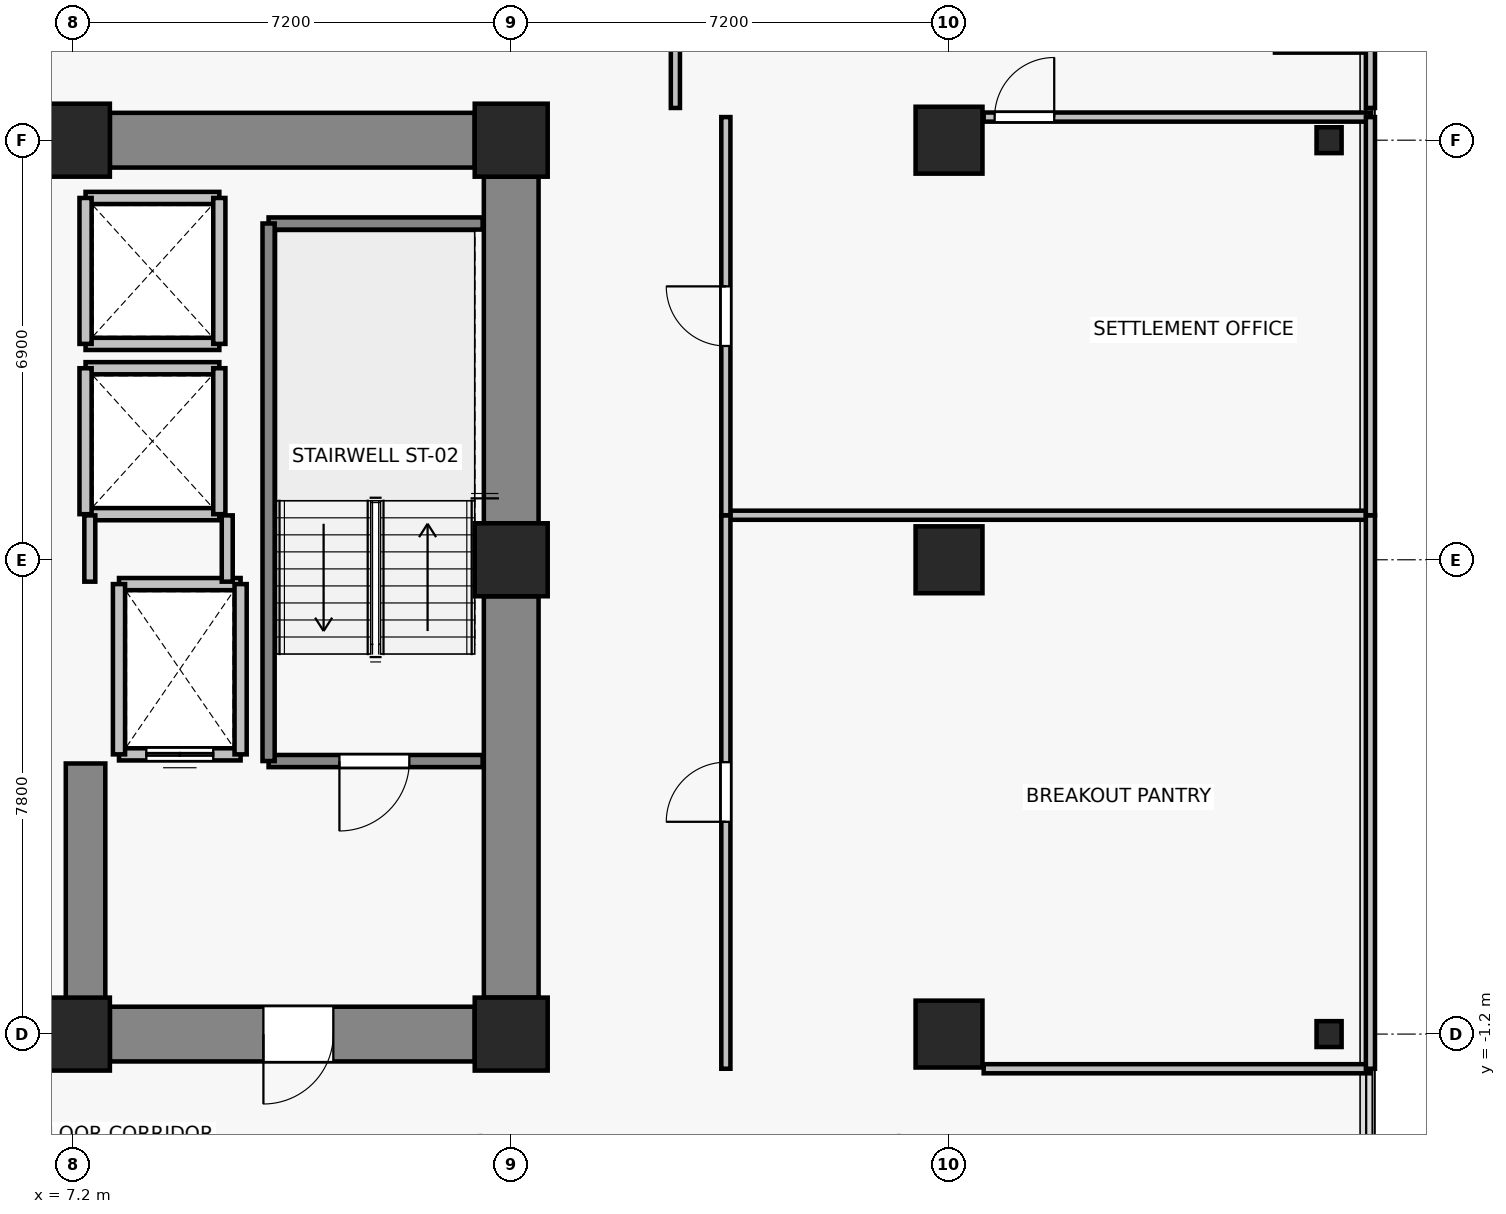
"""IFC4 building model, lengths in metres.
Left out: names, types, materials, properties, quantities, classifications, styles, units other than length and angle.
Written with IfcOpenShell. Run it as: python <this file> out.ifc"""

import sys

from ifc_helpers import new_model, si_unit, direction, frame, frame_2d, origin, origin_2d, place, context, subcontext, project, spatial, rectangle, i_section, extrude, source, transform, mapped, element, fill, save


model = new_model("IFC4")
c1 = context("Model", 3, precision=1e-05, world=origin(), true_north=direction((0.0, 1.0)))
c2 = subcontext(c1, "Body", "Model", "MODEL_VIEW")
j1 = project(units=[si_unit("LENGTHUNIT", "METRE"), si_unit("PLANEANGLEUNIT", "RADIAN")], contexts=[c1])
p1 = place(None, origin())
s1 = spatial("IfcSite", under=j1, at=p1, CompositionType="ELEMENT")
p2 = place(p1, origin())
s2 = spatial("IfcBuilding", under=s1, at=p2, CompositionType="ELEMENT")
p3 = place(p2, frame((0.0, 0.0, 34.0)))
s3 = spatial("IfcBuildingStorey", under=s2, at=p3, CompositionType="ELEMENT", Elevation=34.0)
for number, where, z_axis, x_axis in (
    (1, (7.2, -1.2, 0.0), (0.0, 0.0, 1.0), (1.0, 0.0, 0.0)),
    (2, (14.4, -1.2, 0.0), (0.0, 0.0, 1.0), (1.0, 0.0, 0.0)),
    (3, (14.4, 6.6, 0.0), (0.0, 0.0, 1.0), (1.0, 0.0, 0.0)),
    (4, (7.2, 13.5, 0.0), (0.0, 0.0, 1.0), (1.0, 0.0, 0.0)),
    (5, (14.4, 13.5, 0.0), (0.0, 0.0, 1.0), (1.0, 0.0, 0.0)),
):
    element("IfcColumn", number, at=place(p3, frame(where, z_axis=z_axis, x_axis=x_axis)), inside=s3, PredefinedType="COLUMN", context=c2, shape_type="SweptSolid", body=[
        extrude(rectangle(XDim=1.2, YDim=1.2, at=origin_2d()), origin(), (0.0, 0.0, 1.0), 3.3),
    ])
for number, where, z_axis, x_axis in (
    (6, (21.6, -1.2, 0.0), (0.0, 0.0, 1.0), (1.0, 0.0, 0.0)),
    (7, (21.6, 6.6, 0.0), (0.0, 0.0, 1.0), (1.0, 0.0, 0.0)),
    (8, (21.6, 13.5, 0.0), (0.0, 0.0, 1.0), (1.0, 0.0, 0.0)),
):
    element("IfcColumn", number, at=place(p3, frame(where, z_axis=z_axis, x_axis=x_axis)), inside=s3, PredefinedType="COLUMN", context=c2, shape_type="SweptSolid", body=[
        extrude(rectangle(XDim=1.1, YDim=1.1, at=origin_2d()), origin(), (0.0, 0.0, 1.0), 3.3),
    ])
for number, where, z_axis, x_axis in (
    (9, (27.85, -1.2, 0.0), (0.0, 0.0, 1.0), (1.0, 0.0, 0.0)),
    (10, (27.85, 13.5, 0.0), (0.0, 0.0, 1.0), (1.0, 0.0, 0.0)),
):
    element("IfcColumn", number, at=place(p3, frame(where, z_axis=z_axis, x_axis=x_axis)), inside=s3, PredefinedType="COLUMN", context=c2, shape_type="SweptSolid", body=[
        extrude(i_section(OverallWidth=0.412, OverallDepth=0.425, WebThickness=0.026, FlangeThickness=0.039, FilletRadius=0.015, at=origin_2d()), origin(), (0.0, 0.0, 1.0), 3.3),
    ])
p4 = place(p3, frame((7.8, 13.5, 0.0), z_axis=(0.0, 0.0, 1.0), x_axis=(1.0, 0.0, 0.0)))
e11 = element("IfcWall", 11, at=p4, inside=s3, PredefinedType="SHEAR", context=c2, shape_type="SweptSolid", body=[
    extrude(rectangle(XDim=6.0, YDim=0.9, at=frame_2d((3.0, 0.0))), origin(), (0.0, 0.0, 1.0), 3.075),
])
p5 = place(p3, frame((14.4, -0.6, 0.0), z_axis=(0.0, 0.0, 1.0), x_axis=(0.0, 1.0, 0.0)))
e12 = element("IfcWall", 12, at=p5, inside=s3, PredefinedType="SHEAR", context=c2, shape_type="SweptSolid", body=[
    extrude(rectangle(XDim=6.6, YDim=0.9, at=frame_2d((3.3, 0.0))), origin(), (0.0, 0.0, 1.0), 3.075),
])
p6 = place(p3, frame((14.4, 7.2, 0.0), z_axis=(0.0, 0.0, 1.0), x_axis=(0.0, 1.0, 0.0)))
e13 = element("IfcWall", 13, at=p6, inside=s3, PredefinedType="SHEAR", context=c2, shape_type="SweptSolid", body=[
    extrude(rectangle(XDim=5.7, YDim=0.9, at=frame_2d((2.85, 0.0))), origin(), (0.0, 0.0, 1.0), 3.075),
])
p7 = place(p3, frame((13.8, -1.2, 0.0), z_axis=(0.0, 0.0, 1.0), x_axis=(-1.0, 0.0, 0.0)))
e14 = element("IfcWall", 14, at=p7, inside=s3, PredefinedType="SHEAR", context=c2, shape_type="SweptSolid", body=[
    extrude(rectangle(XDim=6.0, YDim=0.9, at=frame_2d((3.0, 0.0))), origin(), (0.0, 0.0, 1.0), 3.075),
])
p8 = place(p7, frame((2.325, 0.0, 0.0)))
e15 = element("IfcOpeningElement", 15, at=p8, cuts=e14, PredefinedType="OPENING", context=c2, shape_type="SweptSolid", body=[
    extrude(rectangle(XDim=1.15, YDim=2.15, at=frame_2d((0.575, 1.075))), frame((0.0, 0.46, 0.0), z_axis=(0.0, -1.0, 0.0), x_axis=(1.0, 0.0, 0.0)), (0.0, 0.0, 1.0), 0.92),
])
p9 = place(p3, frame((7.4, -0.75, 0.0), z_axis=(0.0, 0.0, 1.0), x_axis=(0.0, 1.0, 0.0)))
e16 = element("IfcWall", 16, at=p9, inside=s3, PredefinedType="SHEAR", context=c2, shape_type="SweptSolid", body=[
    extrude(rectangle(XDim=4.0, YDim=0.65, at=frame_2d((2.0, 0.0))), origin(), (0.0, 0.0, 1.0), 3.075),
])
p10 = place(p3, frame((28.46, 15.06, 0.0), z_axis=(0.0, 0.0, 1.0), x_axis=(-1.0, 0.0, 0.0)))
e17 = element("IfcWall", 17, at=p10, inside=s3, PredefinedType="SOLIDWALL", context=c2, shape_type="SweptSolid", body=[
    extrude(rectangle(XDim=1.5, YDim=0.24, at=frame_2d((0.75, 0.0))), origin(), (0.0, 0.0, 1.0), 3.075),
])
p11 = place(p3, frame((9.95, 3.4, 0.0), z_axis=(0.0, 0.0, 1.0), x_axis=(-1.0, 0.0, 0.0)))
e18 = element("IfcWall", 18, at=p11, inside=s3, PredefinedType="SOLIDWALL", context=c2, shape_type="SweptSolid", body=[
    extrude(rectangle(XDim=2.0, YDim=0.2, at=frame_2d((1.0, 0.0))), origin(), (0.0, 0.0, 1.0), 3.075),
])
p12 = place(p11, frame((0.45, 0.0, 0.0)))
e19 = element("IfcOpeningElement", 19, at=p12, cuts=e18, PredefinedType="OPENING", context=c2, shape_type="SweptSolid", body=[
    extrude(rectangle(XDim=1.1, YDim=2.2, at=frame_2d((0.55, 1.1))), frame((0.0, 0.11, 0.0), z_axis=(0.0, -1.0, 0.0), x_axis=(1.0, 0.0, 0.0)), (0.0, 0.0, 1.0), 0.22),
])
p13 = place(p3, frame((7.95, 6.2, 0.0), z_axis=(0.0, 0.0, 1.0), x_axis=(1.0, 0.0, 0.0)))
e20 = element("IfcWall", 20, at=p13, inside=s3, PredefinedType="SOLIDWALL", context=c2, shape_type="SweptSolid", body=[
    extrude(rectangle(XDim=2.0, YDim=0.2, at=frame_2d((1.0, 0.0))), origin(), (0.0, 0.0, 1.0), 3.075),
])
for number, where, z_axis, x_axis in (
    (21, (7.95, 3.4, 0.0), (0.0, 0.0, 1.0), (0.0, 1.0, 0.0)),
    (22, (9.95, 6.2, 0.0), (0.0, 0.0, 1.0), (0.0, -1.0, 0.0)),
):
    element("IfcWall", number, at=place(p3, frame(where, z_axis=z_axis, x_axis=x_axis)), inside=s3, PredefinedType="SOLIDWALL", context=c2, shape_type="SweptSolid", body=[
        extrude(rectangle(XDim=2.8, YDim=0.2, at=frame_2d((1.4, 0.0))), origin(), (0.0, 0.0, 1.0), 3.075),
    ])
for number, where, z_axis, x_axis in (
    (23, (9.6, 7.35, 0.0), (0.0, 0.0, 1.0), (-1.0, 0.0, 0.0)),
    (24, (7.4, 9.75, 0.0), (0.0, 0.0, 1.0), (1.0, 0.0, 0.0)),
):
    element("IfcWall", number, at=place(p3, frame(where, z_axis=z_axis, x_axis=x_axis)), inside=s3, PredefinedType="SOLIDWALL", context=c2, shape_type="SweptSolid", body=[
        extrude(rectangle(XDim=2.2, YDim=0.2, at=frame_2d((1.1, 0.0))), origin(), (0.0, 0.0, 1.0), 2.465),
    ])
p14 = place(p3, frame((7.4, 7.35, 0.0), z_axis=(0.0, 0.0, 1.0), x_axis=(0.0, 1.0, 0.0)))
e25 = element("IfcWall", 25, at=p14, inside=s3, PredefinedType="SOLIDWALL", context=c2, shape_type="SweptSolid", body=[
    extrude(rectangle(XDim=2.4, YDim=0.2, at=frame_2d((1.2, 0.0))), origin(), (0.0, 0.0, 1.0), 2.465),
])
p15 = place(p3, frame((9.6, 9.75, 0.0), z_axis=(0.0, 0.0, 1.0), x_axis=(0.0, -1.0, 0.0)))
e26 = element("IfcWall", 26, at=p15, inside=s3, PredefinedType="SOLIDWALL", context=c2, shape_type="SweptSolid", body=[
    extrude(rectangle(XDim=2.4, YDim=0.2, at=frame_2d((1.2, 0.0))), origin(), (0.0, 0.0, 1.0), 3.075),
])
for number, where, z_axis, x_axis in (
    (27, (9.6, 10.15, 0.0), (0.0, 0.0, 1.0), (-1.0, 0.0, 0.0)),
    (28, (7.4, 12.55, 0.0), (0.0, 0.0, 1.0), (1.0, 0.0, 0.0)),
):
    element("IfcWall", number, at=place(p3, frame(where, z_axis=z_axis, x_axis=x_axis)), inside=s3, PredefinedType="SOLIDWALL", context=c2, shape_type="SweptSolid", body=[
        extrude(rectangle(XDim=2.2, YDim=0.2, at=frame_2d((1.1, 0.0))), origin(), (0.0, 0.0, 1.0), 2.465),
    ])
p16 = place(p3, frame((7.4, 10.15, 0.0), z_axis=(0.0, 0.0, 1.0), x_axis=(0.0, 1.0, 0.0)))
e29 = element("IfcWall", 29, at=p16, inside=s3, PredefinedType="SOLIDWALL", context=c2, shape_type="SweptSolid", body=[
    extrude(rectangle(XDim=2.4, YDim=0.2, at=frame_2d((1.2, 0.0))), origin(), (0.0, 0.0, 1.0), 2.465),
])
p17 = place(p3, frame((9.6, 12.55, 0.0), z_axis=(0.0, 0.0, 1.0), x_axis=(0.0, -1.0, 0.0)))
e30 = element("IfcWall", 30, at=p17, inside=s3, PredefinedType="SOLIDWALL", context=c2, shape_type="SweptSolid", body=[
    extrude(rectangle(XDim=2.4, YDim=0.2, at=frame_2d((1.2, 0.0))), origin(), (0.0, 0.0, 1.0), 3.075),
])
p18 = place(p3, frame((13.93, 3.29, 0.0), z_axis=(0.0, 0.0, 1.0), x_axis=(-1.0, 0.0, 0.0)))
e31 = element("IfcWall", 31, at=p18, inside=s3, PredefinedType="SOLIDWALL", context=c2, shape_type="SweptSolid", body=[
    extrude(rectangle(XDim=3.52, YDim=0.2, at=frame_2d((1.76, 0.0))), origin(), (0.0, 0.0, 1.0), 3.075),
])
p19 = place(p18, frame((1.205, 0.0, 0.0)))
e32 = element("IfcOpeningElement", 32, at=p19, cuts=e31, PredefinedType="OPENING", context=c2, shape_type="SweptSolid", body=[
    extrude(rectangle(XDim=1.15, YDim=2.15, at=frame_2d((0.575, 1.075))), frame((0.0, 0.11, 0.0), z_axis=(0.0, -1.0, 0.0), x_axis=(1.0, 0.0, 0.0)), (0.0, 0.0, 1.0), 0.22),
])
p20 = place(p3, frame((10.41, 12.13, 0.0), z_axis=(0.0, 0.0, 1.0), x_axis=(1.0, 0.0, 0.0)))
e33 = element("IfcWall", 33, at=p20, inside=s3, PredefinedType="SOLIDWALL", context=c2, shape_type="SweptSolid", body=[
    extrude(rectangle(XDim=3.52, YDim=0.2, at=frame_2d((1.76, 0.0))), origin(), (0.0, 0.0, 1.0), 3.075),
])
p21 = place(p3, frame((10.41, 3.29, 0.0), z_axis=(0.0, 0.0, 1.0), x_axis=(0.0, 1.0, 0.0)))
e34 = element("IfcWall", 34, at=p21, inside=s3, PredefinedType="SOLIDWALL", context=c2, shape_type="SweptSolid", body=[
    extrude(rectangle(XDim=8.84, YDim=0.2, at=frame_2d((4.42, 0.0))), origin(), (0.0, 0.0, 1.0), 3.075),
])
p22 = place(p3, frame((7.47, 6.24, 0.0), z_axis=(0.0, 0.0, 1.0), x_axis=(0.0, 1.0, 0.0)))
e35 = element("IfcWall", 35, at=p22, inside=s3, PredefinedType="PARTITIONING", context=c2, shape_type="SweptSolid", body=[
    extrude(rectangle(XDim=1.09, YDim=0.18, at=frame_2d((0.545, 0.0))), origin(), (0.0, 0.0, 1.0), 2.465),
])
p23 = place(p3, frame((9.73, 7.33, 0.0), z_axis=(0.0, 0.0, 1.0), x_axis=(0.0, -1.0, 0.0)))
e36 = element("IfcWall", 36, at=p23, inside=s3, PredefinedType="PARTITIONING", context=c2, shape_type="SweptSolid", body=[
    extrude(rectangle(XDim=1.09, YDim=0.18, at=frame_2d((0.545, 0.0))), origin(), (0.0, 0.0, 1.0), 3.075),
])
p24 = place(p3, frame((28.53, -1.77, 0.0), z_axis=(0.0, 0.0, 1.0), x_axis=(-1.0, 0.0, 0.0)))
e37 = element("IfcWall", 37, at=p24, inside=s3, PredefinedType="PARTITIONING", context=c2, shape_type="SweptSolid", body=[
    extrude(rectangle(XDim=6.36, YDim=0.15, at=frame_2d((3.18, 0.0))), origin(), (0.0, 0.0, 1.0), 2.465),
])
p25 = place(p3, frame((17.93, 7.333, 0.0), z_axis=(0.0, 0.0, 1.0), x_axis=(1.0, 0.0, 0.0)))
e38 = element("IfcWall", 38, at=p25, inside=s3, PredefinedType="PARTITIONING", context=c2, shape_type="SweptSolid", body=[
    extrude(rectangle(XDim=10.6, YDim=0.15, at=frame_2d((5.3, 0.0))), origin(), (0.0, 0.0, 1.0), 2.465),
])
p26 = place(p3, frame((17.93, -1.77, 0.0), z_axis=(0.0, 0.0, 1.0), x_axis=(0.0, 1.0, 0.0)))
e39 = element("IfcWall", 39, at=p26, inside=s3, PredefinedType="PARTITIONING", context=c2, shape_type="SweptSolid", body=[
    extrude(rectangle(XDim=9.103, YDim=0.15, at=frame_2d((4.551, 0.0))), origin(), (0.0, 0.0, 1.0), 2.465),
])
p27 = place(p26, frame((4.061, 0.0, 0.0)))
e40 = element("IfcOpeningElement", 40, at=p27, cuts=e39, PredefinedType="OPENING", context=c2, shape_type="SweptSolid", body=[
    extrude(rectangle(XDim=0.98, YDim=2.15, at=frame_2d((0.49, 1.075))), frame((0.0, 0.085, 0.0), z_axis=(0.0, -1.0, 0.0), x_axis=(1.0, 0.0, 0.0)), (0.0, 0.0, 1.0), 0.17),
])
p28 = place(p3, frame((28.53, 7.333, 0.0), z_axis=(0.0, 0.0, 1.0), x_axis=(0.0, -1.0, 0.0)))
e41 = element("IfcWall", 41, at=p28, inside=s3, PredefinedType="PARTITIONING", context=c2, shape_type="SweptSolid", body=[
    extrude(rectangle(XDim=9.103, YDim=0.15, at=frame_2d((4.551, 0.0))), origin(), (0.0, 0.0, 1.0), 3.075),
])
p29 = place(p3, frame((22.17, 13.88, 0.0), z_axis=(0.0, 0.0, 1.0), x_axis=(1.0, 0.0, 0.0)))
e42 = element("IfcWall", 42, at=p29, inside=s3, PredefinedType="PARTITIONING", context=c2, shape_type="SweptSolid", body=[
    extrude(rectangle(XDim=6.36, YDim=0.15, at=frame_2d((3.18, 0.0))), origin(), (0.0, 0.0, 1.0), 3.075),
])
p30 = place(p29, frame((0.18, 0.0, 0.0)))
e43 = element("IfcOpeningElement", 43, at=p30, cuts=e42, PredefinedType="OPENING", context=c2, shape_type="SweptSolid", body=[
    extrude(rectangle(XDim=0.98, YDim=2.15, at=frame_2d((0.49, 1.075))), frame((0.0, 0.085, 0.0), z_axis=(0.0, -1.0, 0.0), x_axis=(1.0, 0.0, 0.0)), (0.0, 0.0, 1.0), 0.17),
])
p31 = place(p3, frame((17.93, 7.333, 0.0), z_axis=(0.0, 0.0, 1.0), x_axis=(0.0, 1.0, 0.0)))
e44 = element("IfcWall", 44, at=p31, inside=s3, PredefinedType="PARTITIONING", context=c2, shape_type="SweptSolid", body=[
    extrude(rectangle(XDim=6.547, YDim=0.15, at=frame_2d((3.274, 0.0))), origin(), (0.0, 0.0, 1.0), 2.465),
])
p32 = place(p31, frame((2.783, 0.0, 0.0)))
e45 = element("IfcOpeningElement", 45, at=p32, cuts=e44, PredefinedType="OPENING", context=c2, shape_type="SweptSolid", body=[
    extrude(rectangle(XDim=0.98, YDim=2.15, at=frame_2d((0.49, 1.075))), frame((0.0, 0.085, 0.0), z_axis=(0.0, -1.0, 0.0), x_axis=(1.0, 0.0, 0.0)), (0.0, 0.0, 1.0), 0.17),
])
p33 = place(p3, frame((28.53, 13.88, 0.0), z_axis=(0.0, 0.0, 1.0), x_axis=(0.0, -1.0, 0.0)))
e46 = element("IfcWall", 46, at=p33, inside=s3, PredefinedType="PARTITIONING", context=c2, shape_type="SweptSolid", body=[
    extrude(rectangle(XDim=6.547, YDim=0.15, at=frame_2d((3.274, 0.0))), origin(), (0.0, 0.0, 1.0), 3.075),
])
p34 = place(p3, frame((17.1, 18.13, 0.0), z_axis=(0.0, 0.0, 1.0), x_axis=(0.0, -1.0, 0.0)))
e47 = element("IfcWall", 47, at=p34, inside=s3, PredefinedType="PARTITIONING", context=c2, shape_type="SweptSolid", body=[
    extrude(rectangle(XDim=4.1, YDim=0.15, at=frame_2d((2.05, 0.0))), origin(), (0.0, 0.0, 1.0), 2.465),
])
p35 = place(p3, frame((28.53, 18.13, 0.0), z_axis=(0.0, 0.0, 1.0), x_axis=(0.0, -1.0, 0.0)))
e48 = element("IfcWall", 48, at=p35, inside=s3, PredefinedType="PARTITIONING", context=c2, shape_type="SweptSolid", body=[
    extrude(rectangle(XDim=4.1, YDim=0.15, at=frame_2d((2.05, 0.0))), origin(), (0.0, 0.0, 1.0), 3.075),
])
m1 = source(origin(), c2, "Body", "SweptSolid", [
    extrude(rectangle(XDim=1.1, YDim=2.2, at=frame_2d((0.55, 1.1))), frame((0.0, 0.025, 0.0), z_axis=(0.0, -1.0, 0.0), x_axis=(1.0, 0.0, 0.0)), (0.0, 0.0, 1.0), 0.05),
])
p36 = place(p12, origin())
e49 = element("IfcDoor", 49, at=p36, inside=s3, OperationType="DOUBLE_DOOR_SLIDING", PredefinedType="DOOR", context=c2, shape_type="MappedRepresentation", body=[
    mapped(m1, transform((0.0, 0.0, 0.0), x_axis=(1.0, 0.0, 0.0), y_axis=(0.0, 1.0, 0.0), z_axis=(0.0, 0.0, 1.0), scale=1.0)),
])
fill(e19, e49)
m2 = source(origin(), c2, "Body", "SweptSolid", [
    extrude(rectangle(XDim=1.15, YDim=2.15, at=frame_2d((0.575, 1.075))), frame((0.0, 0.025, 0.0), z_axis=(0.0, -1.0, 0.0), x_axis=(1.0, 0.0, 0.0)), (0.0, 0.0, 1.0), 0.05),
])
p37 = place(p19, origin())
e50 = element("IfcDoor", 50, at=p37, inside=s3, OperationType="SINGLE_SWING_RIGHT", PredefinedType="DOOR", context=c2, shape_type="MappedRepresentation", body=[
    mapped(m2, transform((0.0, 0.0, 0.0), x_axis=(1.0, 0.0, 0.0), y_axis=(0.0, 1.0, 0.0), z_axis=(0.0, 0.0, 1.0), scale=1.0)),
])
fill(e32, e50)
p38 = place(p8, origin())
e51 = element("IfcDoor", 51, at=p38, inside=s3, OperationType="SINGLE_SWING_RIGHT", PredefinedType="DOOR", context=c2, shape_type="MappedRepresentation", body=[
    mapped(m2, transform((0.0, 0.0, 0.0), x_axis=(1.0, 0.0, 0.0), y_axis=(0.0, 1.0, 0.0), z_axis=(0.0, 0.0, 1.0), scale=1.0)),
])
fill(e15, e51)
m3 = source(origin(), c2, "Body", "SweptSolid", [
    extrude(rectangle(XDim=0.98, YDim=2.15, at=frame_2d((0.49, 1.075))), frame((0.0, 0.025, 0.0), z_axis=(0.0, -1.0, 0.0), x_axis=(1.0, 0.0, 0.0)), (0.0, 0.0, 1.0), 0.05),
])
p39 = place(p27, origin())
e52 = element("IfcDoor", 52, at=p39, inside=s3, OperationType="SINGLE_SWING_LEFT", PredefinedType="DOOR", context=c2, shape_type="MappedRepresentation", body=[
    mapped(m3, transform((0.0, 0.0, 0.0), x_axis=(1.0, 0.0, 0.0), y_axis=(0.0, 1.0, 0.0), z_axis=(0.0, 0.0, 1.0), scale=1.0)),
])
fill(e40, e52)
p40 = place(p32, origin())
e53 = element("IfcDoor", 53, at=p40, inside=s3, OperationType="SINGLE_SWING_RIGHT", PredefinedType="DOOR", context=c2, shape_type="MappedRepresentation", body=[
    mapped(m3, transform((0.0, 0.0, 0.0), x_axis=(1.0, 0.0, 0.0), y_axis=(0.0, 1.0, 0.0), z_axis=(0.0, 0.0, 1.0), scale=1.0)),
])
fill(e45, e53)
p41 = place(p30, origin())
e54 = element("IfcDoor", 54, at=p41, inside=s3, OperationType="SINGLE_SWING_RIGHT", PredefinedType="DOOR", context=c2, shape_type="MappedRepresentation", body=[
    mapped(m3, transform((0.0, 0.0, 0.0), x_axis=(1.0, 0.0, 0.0), y_axis=(0.0, 1.0, 0.0), z_axis=(0.0, 0.0, 1.0), scale=1.0)),
])
fill(e43, e54)
save(model, sys.argv[1])
